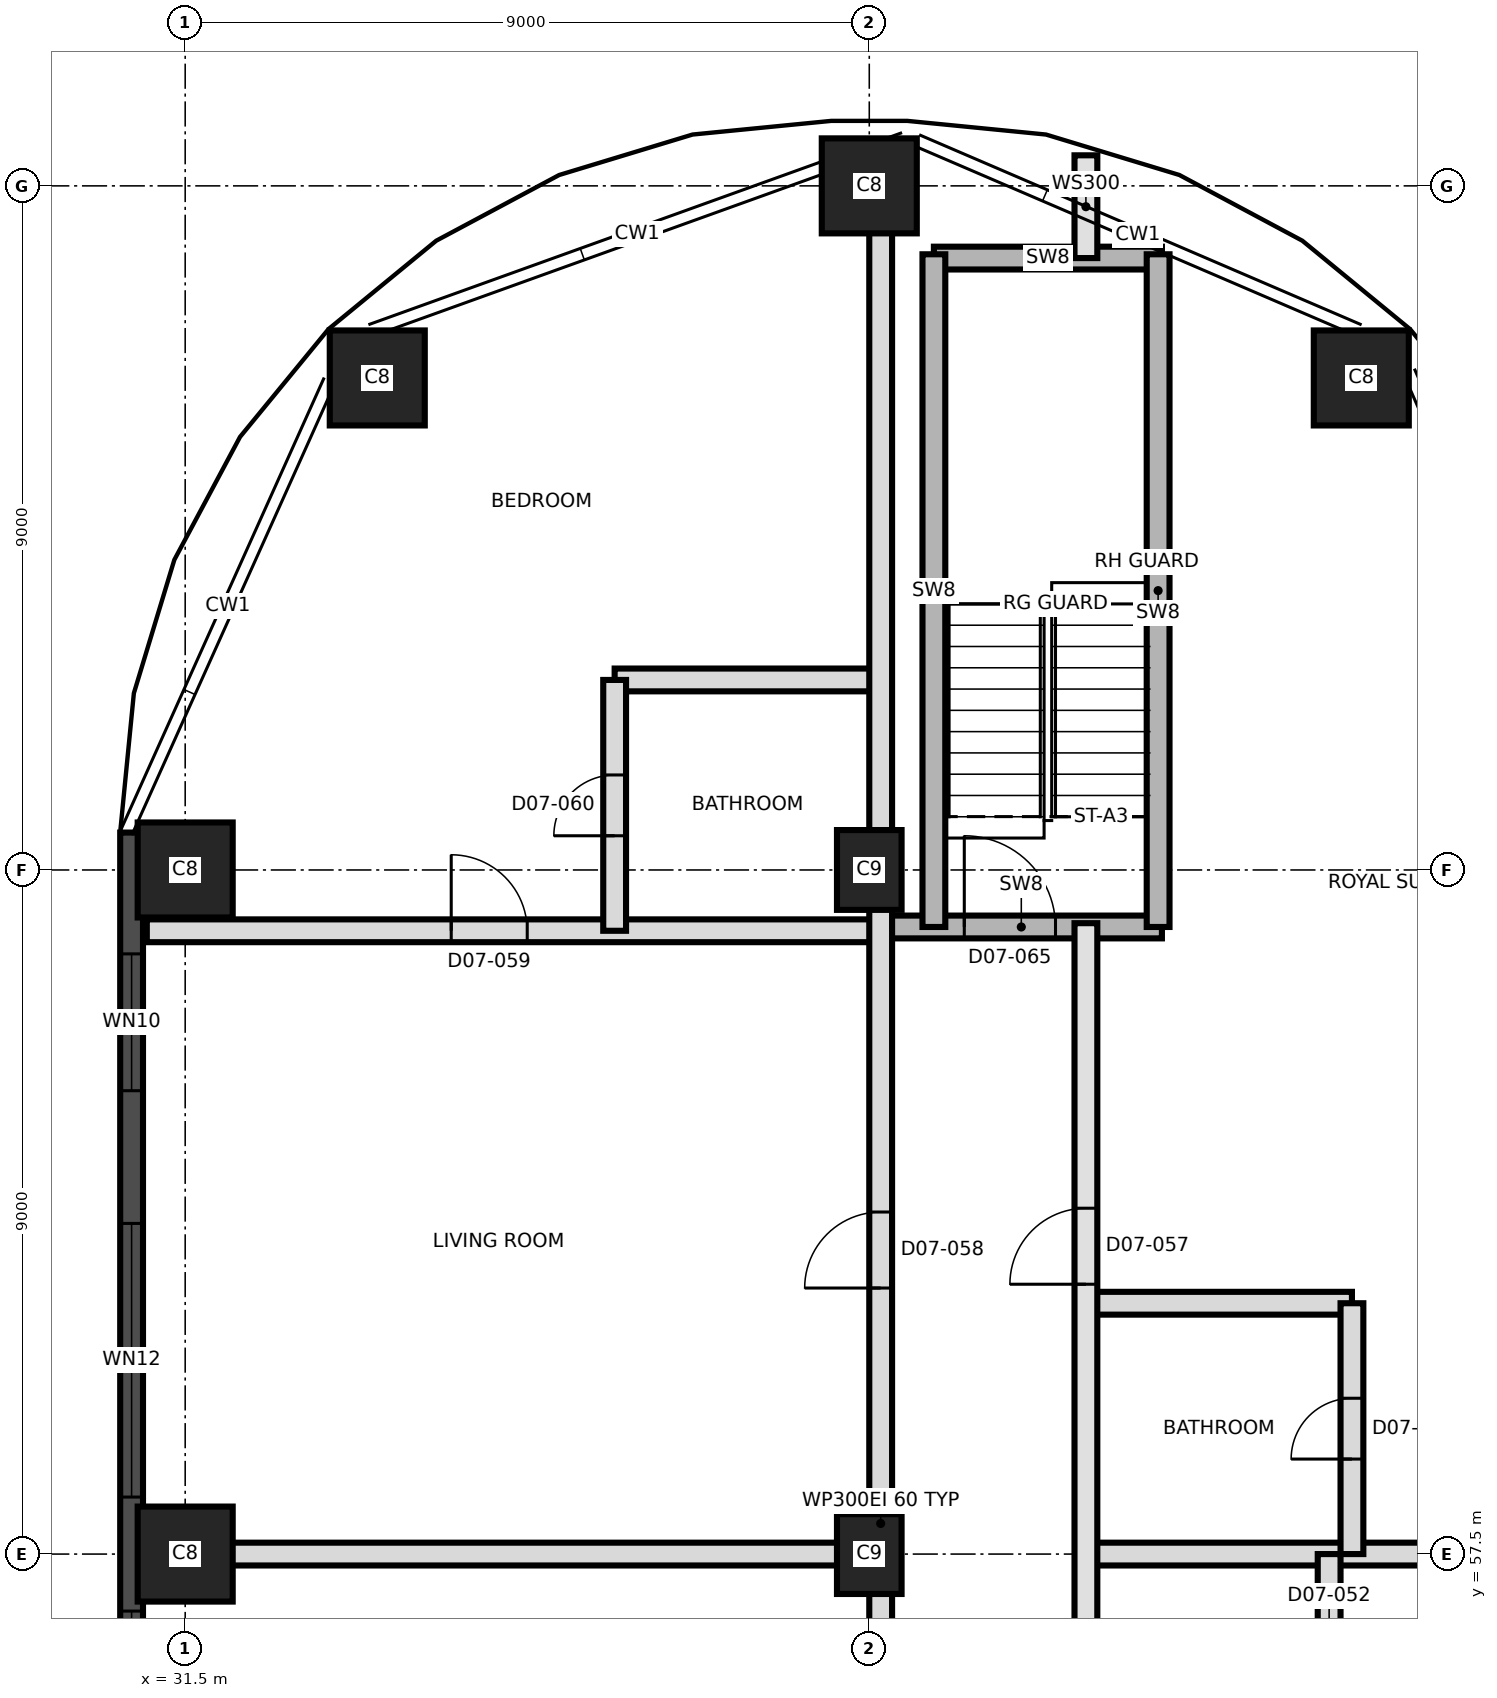
"""IFC4 building model, lengths in metres.
Left out: names, types, materials, properties, quantities, classifications, styles, units other than length and angle.
Written with IfcOpenShell. Run it as: python <this file> out.ifc"""

import sys

from ifc_helpers import new_model, si_unit, direction, frame, frame_2d, origin, origin_2d, place, context, subcontext, project, spatial, rectangle, extrude, element, fill, save


model = new_model("IFC4")
c1 = context("Model", 3, precision=1e-05, world=origin(), true_north=direction((0.0, 1.0)))
c2 = subcontext(c1, "Body", "Model", "MODEL_VIEW")
j1 = project(units=[si_unit("LENGTHUNIT", "METRE"), si_unit("PLANEANGLEUNIT", "RADIAN")], contexts=[c1])
p1 = place(None, origin())
s1 = spatial("IfcSite", under=j1, at=p1, CompositionType="ELEMENT")
p2 = place(p1, origin())
s2 = spatial("IfcBuilding", under=s1, at=p2, CompositionType="ELEMENT")
p3 = place(p2, frame((0.0, 0.0, 94.5)))
s3 = spatial("IfcBuildingStorey", under=s2, at=p3, CompositionType="ELEMENT", Elevation=94.5)
p4 = place(p3, frame((31.5, 57.5, 0.0), z_axis=(0.0, 0.0, 1.0), x_axis=(1.0, 0.0, 0.0)))
e1 = element("IfcColumn", 1, at=p4, inside=s3, PredefinedType="COLUMN", context=c2, shape_type="SweptSolid", body=[
    extrude(rectangle(XDim=1.25, YDim=1.25, at=origin_2d()), origin(), (0.0, 0.0, 1.0), 3.7),
])
p5 = place(p3, frame((40.5, 57.5, 0.0), z_axis=(0.0, 0.0, 1.0), x_axis=(0.0, 1.0, 0.0)))
e2 = element("IfcColumn", 2, at=p5, inside=s3, PredefinedType="COLUMN", context=c2, shape_type="SweptSolid", body=[
    extrude(rectangle(XDim=1.05, YDim=0.85, at=origin_2d()), origin(), (0.0, 0.0, 1.0), 3.7),
])
p6 = place(p3, frame((31.5, 66.5, 0.0), z_axis=(0.0, 0.0, 1.0), x_axis=(1.0, 0.0, 0.0)))
e3 = element("IfcColumn", 3, at=p6, inside=s3, PredefinedType="COLUMN", context=c2, shape_type="SweptSolid", body=[
    extrude(rectangle(XDim=1.25, YDim=1.25, at=origin_2d()), origin(), (0.0, 0.0, 1.0), 3.7),
])
p7 = place(p3, frame((40.5, 66.5, 0.0), z_axis=(0.0, 0.0, 1.0), x_axis=(0.0, 1.0, 0.0)))
e4 = element("IfcColumn", 4, at=p7, inside=s3, PredefinedType="COLUMN", context=c2, shape_type="SweptSolid", body=[
    extrude(rectangle(XDim=1.05, YDim=0.85, at=origin_2d()), origin(), (0.0, 0.0, 1.0), 3.7),
])
for number, where, z_axis, x_axis in (
    (5, (34.027, 72.973, 0.0), (0.0, 0.0, 1.0), (1.0, 0.0, 0.0)),
    (6, (46.973, 72.973, 0.0), (0.0, 0.0, 1.0), (1.0, 0.0, 0.0)),
    (7, (40.5, 75.5, 0.0), (0.0, 0.0, 1.0), (1.0, 0.0, 0.0)),
):
    element("IfcColumn", number, at=place(p3, frame(where, z_axis=z_axis, x_axis=x_axis)), inside=s3, PredefinedType="COLUMN", context=c2, shape_type="SweptSolid", body=[
        extrude(rectangle(XDim=1.25, YDim=1.25, at=origin_2d()), origin(), (0.0, 0.0, 1.0), 3.7),
    ])
p8 = place(p3, frame((30.795, 66.992, 0.0), z_axis=(0.0, 0.0, 1.0), x_axis=(0.0, -1.0, 0.0)))
e8 = element("IfcWall", 8, at=p8, inside=s3, PredefinedType="SOLIDWALL", context=c2, shape_type="SweptSolid", body=[
    extrude(rectangle(XDim=32.981, YDim=0.3, at=frame_2d((16.491, 0.0))), origin(), (0.0, 0.0, 1.0), 3.4),
])
p9 = place(p8, frame((1.596, 0.0, 0.3)))
e9 = element("IfcOpeningElement", 9, at=p9, cuts=e8, PredefinedType="OPENING", context=c2, shape_type="SweptSolid", body=[
    extrude(rectangle(XDim=1.8, YDim=2.4, at=frame_2d((0.9, 1.2))), frame((0.0, 0.16, 0.0), z_axis=(0.0, -1.0, 0.0), x_axis=(1.0, 0.0, 0.0)), (0.0, 0.0, 1.0), 0.32),
])
p10 = place(p8, frame((5.142, 0.0, 0.9)))
e10 = element("IfcOpeningElement", 10, at=p10, cuts=e8, PredefinedType="OPENING", context=c2, shape_type="SweptSolid", body=[
    extrude(rectangle(XDim=3.6, YDim=1.5, at=frame_2d((1.8, 0.75))), frame((0.0, 0.16, 0.0), z_axis=(0.0, -1.0, 0.0), x_axis=(1.0, 0.0, 0.0)), (0.0, 0.0, 1.0), 0.32),
])
p11 = place(p8, frame((10.242, 0.0, 0.9)))
e11 = element("IfcOpeningElement", 11, at=p11, cuts=e8, PredefinedType="OPENING", context=c2, shape_type="SweptSolid", body=[
    extrude(rectangle(XDim=3.6, YDim=1.5, at=frame_2d((1.8, 0.75))), frame((0.0, 0.16, 0.0), z_axis=(0.0, -1.0, 0.0), x_axis=(1.0, 0.0, 0.0)), (0.0, 0.0, 1.0), 0.32),
])
p12 = place(p8, frame((14.142, 0.0, 0.9)))
e12 = element("IfcOpeningElement", 12, at=p12, cuts=e8, PredefinedType="OPENING", context=c2, shape_type="SweptSolid", body=[
    extrude(rectangle(XDim=3.6, YDim=1.5, at=frame_2d((1.8, 0.75))), frame((0.0, 0.16, 0.0), z_axis=(0.0, -1.0, 0.0), x_axis=(1.0, 0.0, 0.0)), (0.0, 0.0, 1.0), 0.32),
])
p13 = place(p8, frame((19.242, 0.0, 0.9)))
e13 = element("IfcOpeningElement", 13, at=p13, cuts=e8, PredefinedType="OPENING", context=c2, shape_type="SweptSolid", body=[
    extrude(rectangle(XDim=3.6, YDim=1.5, at=frame_2d((1.8, 0.75))), frame((0.0, 0.16, 0.0), z_axis=(0.0, -1.0, 0.0), x_axis=(1.0, 0.0, 0.0)), (0.0, 0.0, 1.0), 0.32),
])
p14 = place(p8, frame((23.142, 0.0, 0.9)))
e14 = element("IfcOpeningElement", 14, at=p14, cuts=e8, PredefinedType="OPENING", context=c2, shape_type="SweptSolid", body=[
    extrude(rectangle(XDim=4.2, YDim=1.5, at=frame_2d((2.1, 0.75))), frame((0.0, 0.16, 0.0), z_axis=(0.0, -1.0, 0.0), x_axis=(1.0, 0.0, 0.0)), (0.0, 0.0, 1.0), 0.32),
])
p15 = place(p8, frame((29.337, 0.0, 0.3)))
e15 = element("IfcOpeningElement", 15, at=p15, cuts=e8, PredefinedType="OPENING", context=c2, shape_type="SweptSolid", body=[
    extrude(rectangle(XDim=1.8, YDim=2.4, at=frame_2d((0.9, 1.2))), frame((0.0, 0.16, 0.0), z_axis=(0.0, -1.0, 0.0), x_axis=(1.0, 0.0, 0.0)), (0.0, 0.0, 1.0), 0.32),
])
p16 = place(p3, frame((30.995, 57.5, 0.0), z_axis=(0.0, 0.0, 1.0), x_axis=(1.0, 0.0, 0.0)))
e16 = element("IfcWall", 16, at=p16, inside=s3, PredefinedType="PARTITIONING", context=c2, shape_type="SweptSolid", body=[
    extrude(rectangle(XDim=9.655, YDim=0.3, at=frame_2d((4.827, 0.0))), origin(), (0.0, 0.0, 1.0), 3.35),
])
p17 = place(p3, frame((43.35, 57.5, 0.0), z_axis=(0.0, 0.0, 1.0), x_axis=(1.0, 0.0, 0.0)))
e17 = element("IfcWall", 17, at=p17, inside=s3, PredefinedType="PARTITIONING", context=c2, shape_type="SweptSolid", body=[
    extrude(rectangle(XDim=6.655, YDim=0.3, at=frame_2d((3.327, 0.0))), origin(), (0.0, 0.0, 1.0), 3.35),
])
p18 = place(p3, frame((43.35, 60.8, 0.0), z_axis=(0.0, 0.0, 1.0), x_axis=(1.0, 0.0, 0.0)))
e18 = element("IfcWall", 18, at=p18, inside=s3, PredefinedType="PARTITIONING", context=c2, shape_type="SweptSolid", body=[
    extrude(rectangle(XDim=3.5, YDim=0.3, at=frame_2d((1.75, 0.0))), origin(), (0.0, 0.0, 1.0), 3.4),
])
p19 = place(p3, frame((30.995, 65.7, 0.0), z_axis=(0.0, 0.0, 1.0), x_axis=(1.0, 0.0, 0.0)))
e19 = element("IfcWall", 19, at=p19, inside=s3, PredefinedType="PARTITIONING", context=c2, shape_type="SweptSolid", body=[
    extrude(rectangle(XDim=9.655, YDim=0.3, at=frame_2d((4.827, 0.0))), origin(), (0.0, 0.0, 1.0), 3.35),
])
p20 = place(p19, frame((4.005, 0.0, 0.0)))
e20 = element("IfcOpeningElement", 20, at=p20, cuts=e19, PredefinedType="OPENING", context=c2, shape_type="SweptSolid", body=[
    extrude(rectangle(XDim=1.0, YDim=2.1, at=frame_2d((0.5, 1.05))), frame((0.0, 0.16, 0.0), z_axis=(0.0, -1.0, 0.0), x_axis=(1.0, 0.0, 0.0)), (0.0, 0.0, 1.0), 0.32),
])
p21 = place(p3, frame((40.65, 65.75, 0.0), z_axis=(0.0, 0.0, 1.0), x_axis=(1.0, 0.0, 0.0)))
e21 = element("IfcWall", 21, at=p21, inside=s3, PredefinedType="SHEAR", context=c2, shape_type="SweptSolid", body=[
    extrude(rectangle(XDim=3.7, YDim=0.3, at=frame_2d((1.85, 0.0))), origin(), (0.0, 0.0, 1.0), 3.4),
])
p22 = place(p21, frame((1.1, 0.0, 0.0)))
e22 = element("IfcOpeningElement", 22, at=p22, cuts=e21, PredefinedType="OPENING", context=c2, shape_type="SweptSolid", body=[
    extrude(rectangle(XDim=1.2, YDim=2.1, at=frame_2d((0.6, 1.05))), frame((0.0, 0.16, 0.0), z_axis=(0.0, -1.0, 0.0), x_axis=(1.0, 0.0, 0.0)), (0.0, 0.0, 1.0), 0.32),
])
p23 = place(p3, frame((37.15, 69.0, 0.0), z_axis=(0.0, 0.0, 1.0), x_axis=(1.0, 0.0, 0.0)))
e23 = element("IfcWall", 23, at=p23, inside=s3, PredefinedType="PARTITIONING", context=c2, shape_type="SweptSolid", body=[
    extrude(rectangle(XDim=3.5, YDim=0.3, at=frame_2d((1.75, 0.0))), origin(), (0.0, 0.0, 1.0), 3.4),
])
p24 = place(p3, frame((41.35, 74.55, 0.0), z_axis=(0.0, 0.0, 1.0), x_axis=(1.0, 0.0, 0.0)))
e24 = element("IfcWall", 24, at=p24, inside=s3, PredefinedType="SHEAR", context=c2, shape_type="SweptSolid", body=[
    extrude(rectangle(XDim=3.0, YDim=0.3, at=frame_2d((1.5, 0.0))), origin(), (0.0, 0.0, 1.0), 3.4),
])
p25 = place(p3, frame((37.15, 65.7, 0.0), z_axis=(0.0, 0.0, 1.0), x_axis=(0.0, 1.0, 0.0)))
e25 = element("IfcWall", 25, at=p25, inside=s3, PredefinedType="PARTITIONING", context=c2, shape_type="SweptSolid", body=[
    extrude(rectangle(XDim=3.3, YDim=0.3, at=frame_2d((1.65, 0.0))), origin(), (0.0, 0.0, 1.0), 3.4),
])
p26 = place(p25, frame((1.25, 0.0, 0.0)))
e26 = element("IfcOpeningElement", 26, at=p26, cuts=e25, PredefinedType="OPENING", context=c2, shape_type="SweptSolid", body=[
    extrude(rectangle(XDim=0.8, YDim=2.1, at=frame_2d((0.4, 1.05))), frame((0.0, 0.16, 0.0), z_axis=(0.0, -1.0, 0.0), x_axis=(1.0, 0.0, 0.0)), (0.0, 0.0, 1.0), 0.32),
])
p27 = place(p3, frame((40.65, 39.8, 0.0), z_axis=(0.0, 0.0, 1.0), x_axis=(0.0, 1.0, 0.0)))
e27 = element("IfcWall", 27, at=p27, inside=s3, PredefinedType="PARTITIONING", context=c2, shape_type="SweptSolid", body=[
    extrude(rectangle(XDim=36.205, YDim=0.3, at=frame_2d((18.103, 0.0))), origin(), (0.0, 0.0, 1.0), 3.35),
])
p28 = place(p27, frame((0.835, 0.0, 0.0)))
e28 = element("IfcOpeningElement", 28, at=p28, cuts=e27, PredefinedType="OPENING", context=c2, shape_type="SweptSolid", body=[
    extrude(rectangle(XDim=1.2, YDim=2.1, at=frame_2d((0.6, 1.05))), frame((0.0, 0.16, 0.0), z_axis=(0.0, -1.0, 0.0), x_axis=(1.0, 0.0, 0.0)), (0.0, 0.0, 1.0), 0.32),
])
p29 = place(p27, frame((4.085, 0.0, 0.0)))
e29 = element("IfcOpeningElement", 29, at=p29, cuts=e27, PredefinedType="OPENING", context=c2, shape_type="SweptSolid", body=[
    extrude(rectangle(XDim=1.0, YDim=2.1, at=frame_2d((0.5, 1.05))), frame((0.0, 0.16, 0.0), z_axis=(0.0, -1.0, 0.0), x_axis=(1.0, 0.0, 0.0)), (0.0, 0.0, 1.0), 0.32),
])
p30 = place(p27, frame((14.35, 0.0, 0.0)))
e30 = element("IfcOpeningElement", 30, at=p30, cuts=e27, PredefinedType="OPENING", context=c2, shape_type="SweptSolid", body=[
    extrude(rectangle(XDim=1.0, YDim=2.4, at=frame_2d((0.5, 1.2))), frame((0.0, 0.16, 0.0), z_axis=(0.0, -1.0, 0.0), x_axis=(1.0, 0.0, 0.0)), (0.0, 0.0, 1.0), 0.32),
])
p31 = place(p27, frame((21.2, 0.0, 0.0)))
e31 = element("IfcOpeningElement", 31, at=p31, cuts=e27, PredefinedType="OPENING", context=c2, shape_type="SweptSolid", body=[
    extrude(rectangle(XDim=1.0, YDim=2.4, at=frame_2d((0.5, 1.2))), frame((0.0, 0.16, 0.0), z_axis=(0.0, -1.0, 0.0), x_axis=(1.0, 0.0, 0.0)), (0.0, 0.0, 1.0), 0.32),
])
p32 = place(p3, frame((41.35, 65.75, 0.0), z_axis=(0.0, 0.0, 1.0), x_axis=(0.0, 1.0, 0.0)))
e32 = element("IfcWall", 32, at=p32, inside=s3, PredefinedType="SHEAR", context=c2, shape_type="SweptSolid", body=[
    extrude(rectangle(XDim=8.85, YDim=0.3, at=frame_2d((4.425, 0.0))), origin(), (0.0, 0.0, 1.0), 3.4),
])
p33 = place(p3, frame((43.35, 39.8, 0.0), z_axis=(0.0, 0.0, 1.0), x_axis=(0.0, 1.0, 0.0)))
e33 = element("IfcWall", 33, at=p33, inside=s3, PredefinedType="SOLIDWALL", context=c2, shape_type="SweptSolid", body=[
    extrude(rectangle(XDim=26.0, YDim=0.3, at=frame_2d((13.0, 0.0))), origin(), (0.0, 0.0, 1.0), 3.4),
])
p34 = place(p33, frame((3.115, 0.0, 0.0)))
e34 = element("IfcOpeningElement", 34, at=p34, cuts=e33, PredefinedType="OPENING", context=c2, shape_type="SweptSolid", body=[
    extrude(rectangle(XDim=1.0, YDim=2.1, at=frame_2d((0.5, 1.05))), frame((0.0, 0.16, 0.0), z_axis=(0.0, -1.0, 0.0), x_axis=(1.0, 0.0, 0.0)), (0.0, 0.0, 1.0), 0.32),
])
p35 = place(p33, frame((6.065, 0.0, 0.0)))
e35 = element("IfcOpeningElement", 35, at=p35, cuts=e33, PredefinedType="OPENING", context=c2, shape_type="SweptSolid", body=[
    extrude(rectangle(XDim=1.4, YDim=2.1, at=frame_2d((0.7, 1.05))), frame((0.0, 0.16, 0.0), z_axis=(0.0, -1.0, 0.0), x_axis=(1.0, 0.0, 0.0)), (0.0, 0.0, 1.0), 0.32),
])
p36 = place(p33, frame((9.835, 0.0, 0.0)))
e36 = element("IfcOpeningElement", 36, at=p36, cuts=e33, PredefinedType="OPENING", context=c2, shape_type="SweptSolid", body=[
    extrude(rectangle(XDim=1.2, YDim=2.1, at=frame_2d((0.6, 1.05))), frame((0.0, 0.16, 0.0), z_axis=(0.0, -1.0, 0.0), x_axis=(1.0, 0.0, 0.0)), (0.0, 0.0, 1.0), 0.32),
])
p37 = place(p33, frame((13.085, 0.0, 0.0)))
e37 = element("IfcOpeningElement", 37, at=p37, cuts=e33, PredefinedType="OPENING", context=c2, shape_type="SweptSolid", body=[
    extrude(rectangle(XDim=1.0, YDim=2.1, at=frame_2d((0.5, 1.05))), frame((0.0, 0.16, 0.0), z_axis=(0.0, -1.0, 0.0), x_axis=(1.0, 0.0, 0.0)), (0.0, 0.0, 1.0), 0.32),
])
p38 = place(p33, frame((21.25, 0.0, 0.0)))
e38 = element("IfcOpeningElement", 38, at=p38, cuts=e33, PredefinedType="OPENING", context=c2, shape_type="SweptSolid", body=[
    extrude(rectangle(XDim=1.0, YDim=2.4, at=frame_2d((0.5, 1.2))), frame((0.0, 0.16, 0.0), z_axis=(0.0, -1.0, 0.0), x_axis=(1.0, 0.0, 0.0)), (0.0, 0.0, 1.0), 0.32),
])
p39 = place(p3, frame((43.35, 74.55, 0.0), z_axis=(0.0, 0.0, 1.0), x_axis=(0.0, 1.0, 0.0)))
e39 = element("IfcWall", 39, at=p39, inside=s3, PredefinedType="SOLIDWALL", context=c2, shape_type="SweptSolid", body=[
    extrude(rectangle(XDim=1.352, YDim=0.3, at=frame_2d((0.676, 0.0))), origin(), (0.0, 0.0, 1.0), 3.35),
])
p40 = place(p3, frame((44.3, 65.75, 0.0), z_axis=(0.0, 0.0, 1.0), x_axis=(0.0, 1.0, 0.0)))
e40 = element("IfcWall", 40, at=p40, inside=s3, PredefinedType="SHEAR", context=c2, shape_type="SweptSolid", body=[
    extrude(rectangle(XDim=8.85, YDim=0.3, at=frame_2d((4.425, 0.0))), origin(), (0.0, 0.0, 1.0), 3.4),
])
p41 = place(p3, frame((46.55, 54.8, 0.0), z_axis=(0.0, 0.0, 1.0), x_axis=(0.0, 1.0, 0.0)))
e41 = element("IfcWall", 41, at=p41, inside=s3, PredefinedType="PARTITIONING", context=c2, shape_type="SweptSolid", body=[
    extrude(rectangle(XDim=2.7, YDim=0.3, at=frame_2d((1.35, 0.0))), origin(), (0.0, 0.0, 1.0), 3.4),
])
p42 = place(p41, frame((0.95, 0.0, 0.0)))
e42 = element("IfcOpeningElement", 42, at=p42, cuts=e41, PredefinedType="OPENING", context=c2, shape_type="SweptSolid", body=[
    extrude(rectangle(XDim=0.8, YDim=2.1, at=frame_2d((0.4, 1.05))), frame((0.0, 0.16, 0.0), z_axis=(0.0, -1.0, 0.0), x_axis=(1.0, 0.0, 0.0)), (0.0, 0.0, 1.0), 0.32),
])
p43 = place(p3, frame((46.85, 57.5, 0.0), z_axis=(0.0, 0.0, 1.0), x_axis=(0.0, 1.0, 0.0)))
e43 = element("IfcWall", 43, at=p43, inside=s3, PredefinedType="PARTITIONING", context=c2, shape_type="SweptSolid", body=[
    extrude(rectangle(XDim=3.3, YDim=0.3, at=frame_2d((1.65, 0.0))), origin(), (0.0, 0.0, 1.0), 3.4),
])
p44 = place(p43, frame((1.25, 0.0, 0.0)))
e44 = element("IfcOpeningElement", 44, at=p44, cuts=e43, PredefinedType="OPENING", context=c2, shape_type="SweptSolid", body=[
    extrude(rectangle(XDim=0.8, YDim=2.1, at=frame_2d((0.4, 1.05))), frame((0.0, 0.16, 0.0), z_axis=(0.0, -1.0, 0.0), x_axis=(1.0, 0.0, 0.0)), (0.0, 0.0, 1.0), 0.32),
])
p45 = place(p9, origin())
e45 = element("IfcWindow", 45, at=p45, inside=s3, PartitioningType="SINGLE_PANEL", PredefinedType="WINDOW", context=c2, shape_type="SweptSolid", body=[
    extrude(rectangle(XDim=1.8, YDim=2.4, at=frame_2d((0.9, 1.2))), frame((0.0, 0.03, 0.0), z_axis=(0.0, -1.0, 0.0), x_axis=(1.0, 0.0, 0.0)), (0.0, 0.0, 1.0), 0.06),
])
fill(e9, e45)
p46 = place(p10, origin())
e46 = element("IfcWindow", 46, at=p46, inside=s3, PartitioningType="SINGLE_PANEL", PredefinedType="WINDOW", context=c2, shape_type="SweptSolid", body=[
    extrude(rectangle(XDim=3.6, YDim=1.5, at=frame_2d((1.8, 0.75))), frame((0.0, 0.03, 0.0), z_axis=(0.0, -1.0, 0.0), x_axis=(1.0, 0.0, 0.0)), (0.0, 0.0, 1.0), 0.06),
])
fill(e10, e46)
p47 = place(p11, origin())
e47 = element("IfcWindow", 47, at=p47, inside=s3, PartitioningType="SINGLE_PANEL", PredefinedType="WINDOW", context=c2, shape_type="SweptSolid", body=[
    extrude(rectangle(XDim=3.6, YDim=1.5, at=frame_2d((1.8, 0.75))), frame((0.0, 0.03, 0.0), z_axis=(0.0, -1.0, 0.0), x_axis=(1.0, 0.0, 0.0)), (0.0, 0.0, 1.0), 0.06),
])
fill(e11, e47)
p48 = place(p44, origin())
e48 = element("IfcDoor", 48, at=p48, inside=s3, OperationType="SINGLE_SWING_LEFT", PredefinedType="DOOR", context=c2, shape_type="SweptSolid", body=[
    extrude(rectangle(XDim=0.8, YDim=2.1, at=frame_2d((0.4, 1.05))), frame((0.0, 0.025, 0.0), z_axis=(0.0, -1.0, 0.0), x_axis=(1.0, 0.0, 0.0)), (0.0, 0.0, 1.0), 0.05),
])
fill(e44, e48)
p49 = place(p38, origin())
e49 = element("IfcDoor", 49, at=p49, inside=s3, OperationType="SINGLE_SWING_LEFT", PredefinedType="DOOR", context=c2, shape_type="SweptSolid", body=[
    extrude(rectangle(XDim=1.0, YDim=2.4, at=frame_2d((0.5, 1.2))), frame((0.0, 0.025, 0.0), z_axis=(0.0, -1.0, 0.0), x_axis=(1.0, 0.0, 0.0)), (0.0, 0.0, 1.0), 0.05),
])
fill(e38, e49)
p50 = place(p31, origin())
e50 = element("IfcDoor", 50, at=p50, inside=s3, OperationType="SINGLE_SWING_RIGHT", PredefinedType="DOOR", context=c2, shape_type="SweptSolid", body=[
    extrude(rectangle(XDim=1.0, YDim=2.4, at=frame_2d((0.5, 1.2))), frame((0.0, 0.025, 0.0), z_axis=(0.0, -1.0, 0.0), x_axis=(1.0, 0.0, 0.0)), (0.0, 0.0, 1.0), 0.05),
])
fill(e31, e50)
p51 = place(p20, origin())
e51 = element("IfcDoor", 51, at=p51, inside=s3, OperationType="SINGLE_SWING_LEFT", PredefinedType="DOOR", context=c2, shape_type="SweptSolid", body=[
    extrude(rectangle(XDim=1.0, YDim=2.1, at=frame_2d((0.5, 1.05))), frame((0.0, 0.025, 0.0), z_axis=(0.0, -1.0, 0.0), x_axis=(1.0, 0.0, 0.0)), (0.0, 0.0, 1.0), 0.05),
])
fill(e20, e51)
p52 = place(p26, origin())
e52 = element("IfcDoor", 52, at=p52, inside=s3, OperationType="SINGLE_SWING_LEFT", PredefinedType="DOOR", context=c2, shape_type="SweptSolid", body=[
    extrude(rectangle(XDim=0.8, YDim=2.1, at=frame_2d((0.4, 1.05))), frame((0.0, 0.025, 0.0), z_axis=(0.0, -1.0, 0.0), x_axis=(1.0, 0.0, 0.0)), (0.0, 0.0, 1.0), 0.05),
])
fill(e26, e52)
p53 = place(p22, origin())
e53 = element("IfcDoor", 53, at=p53, inside=s3, OperationType="SINGLE_SWING_RIGHT", PredefinedType="DOOR", context=c2, shape_type="SweptSolid", body=[
    extrude(rectangle(XDim=1.2, YDim=2.1, at=frame_2d((0.6, 1.05))), frame((0.0, 0.025, 0.0), z_axis=(0.0, -1.0, 0.0), x_axis=(1.0, 0.0, 0.0)), (0.0, 0.0, 1.0), 0.05),
])
fill(e22, e53)
save(model, sys.argv[1])
